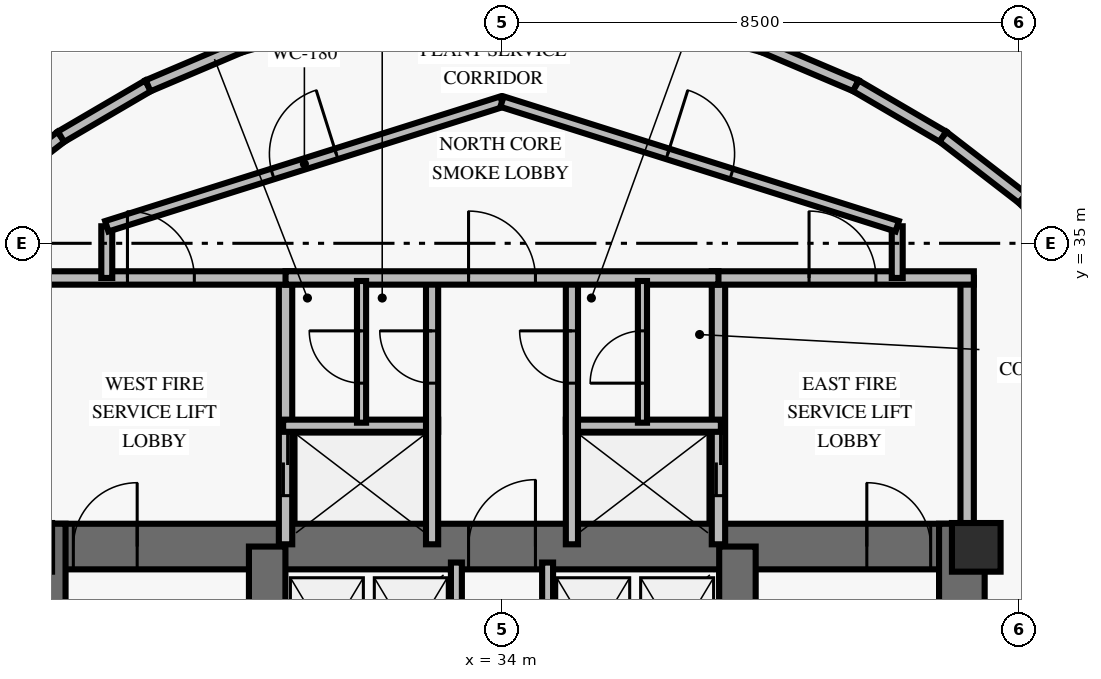
"""IFC4 building model, lengths in metres.
Left out: names, types, materials, properties, quantities, classifications, styles, units other than length and angle.
Written with IfcOpenShell. Run it as: python <this file> out.ifc"""

import sys

from ifc_helpers import new_model, si_unit, direction, frame, frame_2d, origin, origin_2d, place, context, subcontext, project, spatial, rectangle, extrude, element, fill, save


model = new_model("IFC4")
c1 = context("Model", 3, precision=1e-05, world=origin(), true_north=direction((0.0, 1.0)))
c2 = subcontext(c1, "Body", "Model", "MODEL_VIEW")
j1 = project(units=[si_unit("LENGTHUNIT", "METRE"), si_unit("PLANEANGLEUNIT", "RADIAN")], contexts=[c1])
p1 = place(None, origin())
s1 = spatial("IfcSite", under=j1, at=p1, CompositionType="ELEMENT")
p2 = place(p1, origin())
s2 = spatial("IfcBuilding", under=s1, at=p2, CompositionType="ELEMENT")
p3 = place(p2, frame((0.0, 0.0, 220.4)))
s3 = spatial("IfcBuildingStorey", under=s2, at=p3, CompositionType="ELEMENT", Elevation=220.4)
p4 = place(p3, frame((26.072, 30.013, 0.0), z_axis=(0.0, 0.0, 1.0), x_axis=(1.0, 0.0, 0.0)))
e1 = element("IfcWall", 1, at=p4, inside=s3, PredefinedType="SHEAR", context=c2, shape_type="SweptSolid", body=[
    extrude(rectangle(XDim=15.866, YDim=0.75, at=frame_2d((7.933, 0.0))), origin(), (0.0, 0.0, 1.0), 5.0),
])
p5 = place(p4, frame((0.878, 0.0, 0.0)))
e2 = element("IfcOpeningElement", 2, at=p5, cuts=e1, PredefinedType="OPENING", context=c2, shape_type="SweptSolid", body=[
    extrude(rectangle(XDim=1.05, YDim=2.15, at=frame_2d((0.525, 1.075))), frame((0.0, 0.385, 0.0), z_axis=(0.0, -1.0, 0.0), x_axis=(1.0, 0.0, 0.0)), (0.0, 0.0, 1.0), 0.77),
])
p6 = place(p4, frame((13.928, 0.0, 0.0)))
e3 = element("IfcOpeningElement", 3, at=p6, cuts=e1, PredefinedType="OPENING", context=c2, shape_type="SweptSolid", body=[
    extrude(rectangle(XDim=1.05, YDim=2.15, at=frame_2d((0.525, 1.075))), frame((0.0, 0.385, 0.0), z_axis=(0.0, -1.0, 0.0), x_axis=(1.0, 0.0, 0.0)), (0.0, 0.0, 1.0), 0.77),
])
p7 = place(p4, frame((7.378, 0.0, 0.0)))
e4 = element("IfcOpeningElement", 4, at=p7, cuts=e1, PredefinedType="OPENING", context=c2, shape_type="SweptSolid", body=[
    extrude(rectangle(XDim=1.1, YDim=2.15, at=frame_2d((0.55, 1.075))), frame((0.0, 0.385, 0.0), z_axis=(0.0, -1.0, 0.0), x_axis=(1.0, 0.0, 0.0)), (0.0, 0.0, 1.0), 0.77),
])
for number, where, z_axis, x_axis in (
    (5, (26.447, 19.812, 0.0), (0.0, 0.0, 1.0), (0.0, 1.0, 0.0)),
    (6, (41.563, 19.812, 0.0), (0.0, 0.0, 1.0), (0.0, 1.0, 0.0)),
):
    element("IfcWall", number, at=place(p3, frame(where, z_axis=z_axis, x_axis=x_axis)), inside=s3, PredefinedType="SHEAR", context=c2, shape_type="SweptSolid", body=[
        extrude(rectangle(XDim=10.576, YDim=0.75, at=frame_2d((5.288, 0.0))), origin(), (0.0, 0.0, 1.0), 5.0),
    ])
for number, where, z_axis, x_axis in (
    (7, (30.138, 20.187, 0.0), (0.0, 0.0, 1.0), (0.0, 1.0, 0.0)),
    (8, (37.872, 20.187, 0.0), (0.0, 0.0, 1.0), (0.0, 1.0, 0.0)),
):
    element("IfcWall", number, at=place(p3, frame(where, z_axis=z_axis, x_axis=x_axis)), inside=s3, PredefinedType="SHEAR", context=c2, shape_type="SweptSolid", body=[
        extrude(rectangle(XDim=9.826, YDim=0.6, at=frame_2d((4.913, 0.0))), origin(), (0.0, 0.0, 1.0), 5.0),
    ])
p8 = place(p3, frame((41.8, 30.0, 0.0), z_axis=(0.0, 0.0, 1.0), x_axis=(1.0, 0.0, 0.0)))
e9 = element("IfcColumn", 9, at=p8, inside=s3, PredefinedType="PILASTER", context=c2, shape_type="SweptSolid", body=[
    extrude(rectangle(XDim=0.8, YDim=0.8, at=origin_2d()), origin(), (0.0, 0.0, 1.0), 5.0),
])
p9 = place(p3, frame((28.995, 42.149, 0.0), z_axis=(0.0, 0.0, 1.0), x_axis=(-0.799376092576, -0.600830976747, 0.0)))
e10 = element("IfcWall", 10, at=p9, inside=s3, PredefinedType="SOLIDWALL", context=c2, shape_type="SweptSolid", body=[
    extrude(rectangle(XDim=8.129, YDim=0.3, at=frame_2d((4.064, 0.0))), origin(), (0.0, 0.0, 1.0), 3.96),
])
p10 = place(p3, frame((30.44, 30.05, 0.0), z_axis=(0.0, 0.0, 1.0), x_axis=(0.0, 1.0, 0.0)))
e11 = element("IfcWall", 11, at=p10, inside=s3, PredefinedType="SOLIDWALL", context=c2, shape_type="SweptSolid", body=[
    extrude(rectangle(XDim=4.38, YDim=0.22, at=frame_2d((2.19, 0.0))), origin(), (0.0, 0.0, 1.0), 2.8),
])
p11 = place(p10, frame((0.8, 0.0, 0.0)))
e12 = element("IfcOpeningElement", 12, at=p11, cuts=e11, PredefinedType="OPENING", context=c2, shape_type="SweptSolid", body=[
    extrude(rectangle(XDim=1.05, YDim=2.1, at=frame_2d((0.525, 1.05))), frame((0.0, 0.12, 0.0), z_axis=(0.0, -1.0, 0.0), x_axis=(1.0, 0.0, 0.0)), (0.0, 0.0, 1.0), 0.24),
])
p12 = place(p3, frame((26.24, 34.43, 0.0), z_axis=(0.0, 0.0, 1.0), x_axis=(1.0, 0.0, 0.0)))
e13 = element("IfcWall", 13, at=p12, inside=s3, PredefinedType="SOLIDWALL", context=c2, shape_type="SweptSolid", body=[
    extrude(rectangle(XDim=4.31, YDim=0.22, at=frame_2d((2.155, 0.0))), origin(), (0.0, 0.0, 1.0), 2.8),
])
p13 = place(p12, frame((1.6, 0.0, 0.0)))
e14 = element("IfcOpeningElement", 14, at=p13, cuts=e13, PredefinedType="OPENING", context=c2, shape_type="SweptSolid", body=[
    extrude(rectangle(XDim=1.1, YDim=2.15, at=frame_2d((0.55, 1.075))), frame((0.0, 0.12, 0.0), z_axis=(0.0, -1.0, 0.0), x_axis=(1.0, 0.0, 0.0)), (0.0, 0.0, 1.0), 0.24),
])
p14 = place(p3, frame((30.4, 32.0, 0.0), z_axis=(0.0, 0.0, 1.0), x_axis=(1.0, 0.0, 0.0)))
e15 = element("IfcWall", 15, at=p14, inside=s3, PredefinedType="SOLIDWALL", context=c2, shape_type="SweptSolid", body=[
    extrude(rectangle(XDim=2.55, YDim=0.2, at=frame_2d((1.275, 0.0))), origin(), (0.0, 0.0, 1.0), 2.8),
])
p15 = place(p3, frame((32.85, 30.05, 0.0), z_axis=(0.0, 0.0, 1.0), x_axis=(0.0, 1.0, 0.0)))
e16 = element("IfcWall", 16, at=p15, inside=s3, PredefinedType="SOLIDWALL", context=c2, shape_type="SweptSolid", body=[
    extrude(rectangle(XDim=4.38, YDim=0.2, at=frame_2d((2.19, 0.0))), origin(), (0.0, 0.0, 1.0), 2.8),
])
p16 = place(p15, frame((2.65, 0.0, 0.0)))
e17 = element("IfcOpeningElement", 17, at=p16, cuts=e16, PredefinedType="OPENING", context=c2, shape_type="SweptSolid", body=[
    extrude(rectangle(XDim=0.86, YDim=2.05, at=frame_2d((0.43, 1.025))), frame((0.0, 0.11, 0.0), z_axis=(0.0, -1.0, 0.0), x_axis=(1.0, 0.0, 0.0)), (0.0, 0.0, 1.0), 0.22),
])
p17 = place(p3, frame((37.56, 30.05, 0.0), z_axis=(0.0, 0.0, 1.0), x_axis=(0.0, 1.0, 0.0)))
e18 = element("IfcWall", 18, at=p17, inside=s3, PredefinedType="SOLIDWALL", context=c2, shape_type="SweptSolid", body=[
    extrude(rectangle(XDim=4.38, YDim=0.22, at=frame_2d((2.19, 0.0))), origin(), (0.0, 0.0, 1.0), 2.8),
])
p18 = place(p17, frame((0.8, 0.0, 0.0)))
e19 = element("IfcOpeningElement", 19, at=p18, cuts=e18, PredefinedType="OPENING", context=c2, shape_type="SweptSolid", body=[
    extrude(rectangle(XDim=1.05, YDim=2.1, at=frame_2d((0.525, 1.05))), frame((0.0, 0.12, 0.0), z_axis=(0.0, -1.0, 0.0), x_axis=(1.0, 0.0, 0.0)), (0.0, 0.0, 1.0), 0.24),
])
p19 = place(p3, frame((41.65, 30.05, 0.0), z_axis=(0.0, 0.0, 1.0), x_axis=(0.0, 1.0, 0.0)))
e20 = element("IfcWall", 20, at=p19, inside=s3, PredefinedType="SOLIDWALL", context=c2, shape_type="SweptSolid", body=[
    extrude(rectangle(XDim=4.38, YDim=0.22, at=frame_2d((2.19, 0.0))), origin(), (0.0, 0.0, 1.0), 2.8),
])
p20 = place(p3, frame((37.45, 34.43, 0.0), z_axis=(0.0, 0.0, 1.0), x_axis=(1.0, 0.0, 0.0)))
e21 = element("IfcWall", 21, at=p20, inside=s3, PredefinedType="SOLIDWALL", context=c2, shape_type="SweptSolid", body=[
    extrude(rectangle(XDim=4.31, YDim=0.22, at=frame_2d((2.155, 0.0))), origin(), (0.0, 0.0, 1.0), 2.8),
])
p21 = place(p20, frame((1.6, 0.0, 0.0)))
e22 = element("IfcOpeningElement", 22, at=p21, cuts=e21, PredefinedType="OPENING", context=c2, shape_type="SweptSolid", body=[
    extrude(rectangle(XDim=1.1, YDim=2.15, at=frame_2d((0.55, 1.075))), frame((0.0, 0.12, 0.0), z_axis=(0.0, -1.0, 0.0), x_axis=(1.0, 0.0, 0.0)), (0.0, 0.0, 1.0), 0.24),
])
p22 = place(p3, frame((35.05, 32.0, 0.0), z_axis=(0.0, 0.0, 1.0), x_axis=(1.0, 0.0, 0.0)))
e23 = element("IfcWall", 23, at=p22, inside=s3, PredefinedType="SOLIDWALL", context=c2, shape_type="SweptSolid", body=[
    extrude(rectangle(XDim=2.55, YDim=0.2, at=frame_2d((1.275, 0.0))), origin(), (0.0, 0.0, 1.0), 2.8),
])
p23 = place(p3, frame((35.15, 30.05, 0.0), z_axis=(0.0, 0.0, 1.0), x_axis=(0.0, 1.0, 0.0)))
e24 = element("IfcWall", 24, at=p23, inside=s3, PredefinedType="SOLIDWALL", context=c2, shape_type="SweptSolid", body=[
    extrude(rectangle(XDim=4.38, YDim=0.2, at=frame_2d((2.19, 0.0))), origin(), (0.0, 0.0, 1.0), 2.8),
])
p24 = place(p23, frame((2.65, 0.0, 0.0)))
e25 = element("IfcOpeningElement", 25, at=p24, cuts=e24, PredefinedType="OPENING", context=c2, shape_type="SweptSolid", body=[
    extrude(rectangle(XDim=0.86, YDim=2.05, at=frame_2d((0.43, 1.025))), frame((0.0, 0.11, 0.0), z_axis=(0.0, -1.0, 0.0), x_axis=(1.0, 0.0, 0.0)), (0.0, 0.0, 1.0), 0.22),
])
p25 = place(p3, frame((30.44, 34.43, 0.0), z_axis=(0.0, 0.0, 1.0), x_axis=(1.0, 0.0, 0.0)))
e26 = element("IfcWall", 26, at=p25, inside=s3, PredefinedType="SOLIDWALL", context=c2, shape_type="SweptSolid", body=[
    extrude(rectangle(XDim=7.12, YDim=0.22, at=frame_2d((3.56, 0.0))), origin(), (0.0, 0.0, 1.0), 2.8),
])
p26 = place(p25, frame((3.01, 0.0, 0.0)))
e27 = element("IfcOpeningElement", 27, at=p26, cuts=e26, PredefinedType="OPENING", context=c2, shape_type="SweptSolid", body=[
    extrude(rectangle(XDim=1.1, YDim=2.15, at=frame_2d((0.55, 1.075))), frame((0.0, 0.12, 0.0), z_axis=(0.0, -1.0, 0.0), x_axis=(1.0, 0.0, 0.0)), (0.0, 0.0, 1.0), 0.24),
])
p27 = place(p3, frame((31.69, 32.05, 0.0), z_axis=(0.0, 0.0, 1.0), x_axis=(0.0, 1.0, 0.0)))
e28 = element("IfcWall", 28, at=p27, inside=s3, PredefinedType="PARTITIONING", context=c2, shape_type="SweptSolid", body=[
    extrude(rectangle(XDim=2.33, YDim=0.15, at=frame_2d((1.165, 0.0))), origin(), (0.0, 0.0, 1.0), 2.8),
])
p28 = place(p27, frame((0.65, 0.0, 0.0)))
e29 = element("IfcOpeningElement", 29, at=p28, cuts=e28, PredefinedType="OPENING", context=c2, shape_type="SweptSolid", body=[
    extrude(rectangle(XDim=0.86, YDim=2.05, at=frame_2d((0.43, 1.025))), frame((0.0, 0.085, 0.0), z_axis=(0.0, -1.0, 0.0), x_axis=(1.0, 0.0, 0.0)), (0.0, 0.0, 1.0), 0.17),
])
p29 = place(p3, frame((36.31, 32.05, 0.0), z_axis=(0.0, 0.0, 1.0), x_axis=(0.0, 1.0, 0.0)))
e30 = element("IfcWall", 30, at=p29, inside=s3, PredefinedType="PARTITIONING", context=c2, shape_type="SweptSolid", body=[
    extrude(rectangle(XDim=2.33, YDim=0.15, at=frame_2d((1.165, 0.0))), origin(), (0.0, 0.0, 1.0), 2.8),
])
p30 = place(p29, frame((0.65, 0.0, 0.0)))
e31 = element("IfcOpeningElement", 31, at=p30, cuts=e30, PredefinedType="OPENING", context=c2, shape_type="SweptSolid", body=[
    extrude(rectangle(XDim=0.86, YDim=2.05, at=frame_2d((0.43, 1.025))), frame((0.0, 0.085, 0.0), z_axis=(0.0, -1.0, 0.0), x_axis=(1.0, 0.0, 0.0)), (0.0, 0.0, 1.0), 0.17),
])
for number, where, z_axis, x_axis in (
    (32, (33.25, 27.28, 0.0), (0.0, 0.0, 1.0), (0.0, 1.0, 0.0)),
    (33, (34.75, 27.28, 0.0), (0.0, 0.0, 1.0), (0.0, 1.0, 0.0)),
):
    element("IfcWall", number, at=place(p3, frame(where, z_axis=z_axis, x_axis=x_axis)), inside=s3, PredefinedType="SOLIDWALL", context=c2, shape_type="SweptSolid", body=[
        extrude(rectangle(XDim=2.47, YDim=0.18, at=frame_2d((1.235, 0.0))), origin(), (0.0, 0.0, 1.0), 2.8),
    ])
for number, where, z_axis, x_axis in (
    (34, (27.5, 34.43, 0.0), (0.0, 0.0, 1.0), (0.0, 1.0, 0.0)),
    (35, (40.5, 35.28, 0.0), (0.0, 0.0, 1.0), (0.0, -1.0, 0.0)),
):
    element("IfcWall", number, at=place(p3, frame(where, z_axis=z_axis, x_axis=x_axis)), inside=s3, PredefinedType="PARTITIONING", context=c2, shape_type="SweptSolid", body=[
        extrude(rectangle(XDim=0.85, YDim=0.18, at=frame_2d((0.425, 0.0))), origin(), (0.0, 0.0, 1.0), 2.8),
    ])
p31 = place(p3, frame((27.5, 35.28, 0.0), z_axis=(0.0, 0.0, 1.0), x_axis=(0.953691418528, 0.300786765376, 0.0)))
e36 = element("IfcWall", 36, at=p31, inside=s3, PredefinedType="PARTITIONING", context=c2, shape_type="SweptSolid", body=[
    extrude(rectangle(XDim=6.816, YDim=0.18, at=frame_2d((3.408, 0.0))), origin(), (0.0, 0.0, 1.0), 2.8),
])
p32 = place(p31, frame((2.858, 0.0, 0.0)))
e37 = element("IfcOpeningElement", 37, at=p32, cuts=e36, PredefinedType="OPENING", context=c2, shape_type="SweptSolid", body=[
    extrude(rectangle(XDim=1.1, YDim=2.15, at=frame_2d((0.55, 1.075))), frame((0.0, 0.1, 0.0), z_axis=(0.0, -1.0, 0.0), x_axis=(1.0, 0.0, 0.0)), (0.0, 0.0, 1.0), 0.2),
])
p33 = place(p3, frame((34.0, 37.33, 0.0), z_axis=(0.0, 0.0, 1.0), x_axis=(0.953691418528, -0.300786765376, 0.0)))
e38 = element("IfcWall", 38, at=p33, inside=s3, PredefinedType="PARTITIONING", context=c2, shape_type="SweptSolid", body=[
    extrude(rectangle(XDim=6.816, YDim=0.18, at=frame_2d((3.408, 0.0))), origin(), (0.0, 0.0, 1.0), 2.8),
])
p34 = place(p33, frame((2.858, 0.0, 0.0)))
e39 = element("IfcOpeningElement", 39, at=p34, cuts=e38, PredefinedType="OPENING", context=c2, shape_type="SweptSolid", body=[
    extrude(rectangle(XDim=1.1, YDim=2.15, at=frame_2d((0.55, 1.075))), frame((0.0, 0.1, 0.0), z_axis=(0.0, -1.0, 0.0), x_axis=(1.0, 0.0, 0.0)), (0.0, 0.0, 1.0), 0.2),
])
for number, where, z_axis, x_axis in (
    (40, (25.434, 35.739, 0.0), (0.0, 0.0, 1.0), (0.792, 0.611, 0.0)),
    (41, (26.747, 36.753, 0.0), (0.0, 0.0, 1.0), (0.863, 0.505, 0.0)),
):
    element("IfcWall", number, at=place(p3, frame(where, z_axis=z_axis, x_axis=x_axis)), inside=s3, PredefinedType="SOLIDWALL", context=c2, shape_type="SweptSolid", body=[
        extrude(rectangle(XDim=1.659, YDim=0.2, at=frame_2d((0.83, 0.0))), origin(), (0.0, 0.0, 1.0), 2.8),
    ])
p35 = place(p3, frame((28.179, 37.59, 0.0), z_axis=(0.0, 0.0, 1.0), x_axis=(0.920487144923, 0.390772844543, 0.0)))
e42 = element("IfcWall", 42, at=p35, inside=s3, PredefinedType="SOLIDWALL", context=c2, shape_type="SweptSolid", body=[
    extrude(rectangle(XDim=1.659, YDim=0.2, at=frame_2d((0.829, 0.0))), origin(), (0.0, 0.0, 1.0), 2.8),
])
for number, where, z_axis, x_axis in (
    (43, (29.706, 38.239, 0.0), (0.0, 0.0, 1.0), (0.963, 0.27, 0.0)),
    (44, (36.697, 38.687, 0.0), (0.0, 0.0, 1.0), (0.963, -0.27, 0.0)),
):
    element("IfcWall", number, at=place(p3, frame(where, z_axis=z_axis, x_axis=x_axis)), inside=s3, PredefinedType="SOLIDWALL", context=c2, shape_type="SweptSolid", body=[
        extrude(rectangle(XDim=1.659, YDim=0.2, at=frame_2d((0.83, 0.0))), origin(), (0.0, 0.0, 1.0), 2.8),
    ])
p36 = place(p3, frame((38.294, 38.239, 0.0), z_axis=(0.0, 0.0, 1.0), x_axis=(0.920487144923, -0.390772844543, 0.0)))
e45 = element("IfcWall", 45, at=p36, inside=s3, PredefinedType="SOLIDWALL", context=c2, shape_type="SweptSolid", body=[
    extrude(rectangle(XDim=1.659, YDim=0.2, at=frame_2d((0.829, 0.0))), origin(), (0.0, 0.0, 1.0), 2.8),
])
for number, where, z_axis, x_axis in (
    (46, (39.821, 37.59, 0.0), (0.0, 0.0, 1.0), (0.863, -0.505, 0.0)),
    (47, (41.253, 36.753, 0.0), (0.0, 0.0, 1.0), (0.792, -0.611, 0.0)),
):
    element("IfcWall", number, at=place(p3, frame(where, z_axis=z_axis, x_axis=x_axis)), inside=s3, PredefinedType="SOLIDWALL", context=c2, shape_type="SweptSolid", body=[
        extrude(rectangle(XDim=1.659, YDim=0.2, at=frame_2d((0.83, 0.0))), origin(), (0.0, 0.0, 1.0), 2.8),
    ])
p37 = place(p3, frame((42.566, 35.739, 0.0), z_axis=(0.0, 0.0, 1.0), x_axis=(0.707106781187, -0.707106781187, 0.0)))
e48 = element("IfcWall", 48, at=p37, inside=s3, PredefinedType="SOLIDWALL", context=c2, shape_type="SweptSolid", body=[
    extrude(rectangle(XDim=1.659, YDim=0.2, at=frame_2d((0.83, 0.0))), origin(), (0.0, 0.0, 1.0), 2.8),
])
p38 = place(p37, frame((0.304, 0.0, 0.0)))
e49 = element("IfcOpeningElement", 49, at=p38, cuts=e48, PredefinedType="OPENING", context=c2, shape_type="SweptSolid", body=[
    extrude(rectangle(XDim=1.05, YDim=2.15, at=frame_2d((0.525, 1.075))), frame((0.0, 0.11, 0.0), z_axis=(0.0, -1.0, 0.0), x_axis=(1.0, 0.0, 0.0)), (0.0, 0.0, 1.0), 0.22),
])
p39 = place(p5, origin())
e50 = element("IfcDoor", 50, at=p39, inside=s3, OperationType="SINGLE_SWING_RIGHT", PredefinedType="DOOR", context=c2, shape_type="SweptSolid", body=[
    extrude(rectangle(XDim=1.05, YDim=2.15, at=frame_2d((0.525, 1.075))), frame((0.0, 0.025, 0.0), z_axis=(0.0, -1.0, 0.0), x_axis=(1.0, 0.0, 0.0)), (0.0, 0.0, 1.0), 0.05),
])
fill(e2, e50)
p40 = place(p6, origin())
e51 = element("IfcDoor", 51, at=p40, inside=s3, OperationType="SINGLE_SWING_LEFT", PredefinedType="DOOR", context=c2, shape_type="SweptSolid", body=[
    extrude(rectangle(XDim=1.05, YDim=2.15, at=frame_2d((0.525, 1.075))), frame((0.0, 0.025, 0.0), z_axis=(0.0, -1.0, 0.0), x_axis=(1.0, 0.0, 0.0)), (0.0, 0.0, 1.0), 0.05),
])
fill(e3, e51)
p41 = place(p7, origin())
e52 = element("IfcDoor", 52, at=p41, inside=s3, OperationType="SINGLE_SWING_RIGHT", PredefinedType="DOOR", context=c2, shape_type="SweptSolid", body=[
    extrude(rectangle(XDim=1.1, YDim=2.15, at=frame_2d((0.55, 1.075))), frame((0.0, 0.025, 0.0), z_axis=(0.0, -1.0, 0.0), x_axis=(1.0, 0.0, 0.0)), (0.0, 0.0, 1.0), 0.05),
])
fill(e4, e52)
p42 = place(p13, origin())
e53 = element("IfcDoor", 53, at=p42, inside=s3, OperationType="SINGLE_SWING_LEFT", PredefinedType="DOOR", context=c2, shape_type="SweptSolid", body=[
    extrude(rectangle(XDim=1.1, YDim=2.15, at=frame_2d((0.55, 1.075))), frame((0.0, 0.025, 0.0), z_axis=(0.0, -1.0, 0.0), x_axis=(1.0, 0.0, 0.0)), (0.0, 0.0, 1.0), 0.05),
])
fill(e14, e53)
p43 = place(p11, origin())
e54 = element("IfcDoor", 54, at=p43, inside=s3, OperationType="DOUBLE_DOOR_SLIDING", PredefinedType="USERDEFINED", context=c2, shape_type="SweptSolid", body=[
    extrude(rectangle(XDim=1.05, YDim=2.1, at=frame_2d((0.525, 1.05))), frame((0.0, 0.025, 0.0), z_axis=(0.0, -1.0, 0.0), x_axis=(1.0, 0.0, 0.0)), (0.0, 0.0, 1.0), 0.05),
])
fill(e12, e54)
p44 = place(p16, origin())
e55 = element("IfcDoor", 55, at=p44, inside=s3, OperationType="SINGLE_SWING_RIGHT", PredefinedType="TRAPDOOR", context=c2, shape_type="SweptSolid", body=[
    extrude(rectangle(XDim=0.86, YDim=2.05, at=frame_2d((0.43, 1.025))), frame((0.0, 0.025, 0.0), z_axis=(0.0, -1.0, 0.0), x_axis=(1.0, 0.0, 0.0)), (0.0, 0.0, 1.0), 0.05),
])
fill(e17, e55)
p45 = place(p21, origin())
e56 = element("IfcDoor", 56, at=p45, inside=s3, OperationType="SINGLE_SWING_LEFT", PredefinedType="DOOR", context=c2, shape_type="SweptSolid", body=[
    extrude(rectangle(XDim=1.1, YDim=2.15, at=frame_2d((0.55, 1.075))), frame((0.0, 0.025, 0.0), z_axis=(0.0, -1.0, 0.0), x_axis=(1.0, 0.0, 0.0)), (0.0, 0.0, 1.0), 0.05),
])
fill(e22, e56)
p46 = place(p18, origin())
e57 = element("IfcDoor", 57, at=p46, inside=s3, OperationType="DOUBLE_DOOR_SLIDING", PredefinedType="USERDEFINED", context=c2, shape_type="SweptSolid", body=[
    extrude(rectangle(XDim=1.05, YDim=2.1, at=frame_2d((0.525, 1.05))), frame((0.0, 0.025, 0.0), z_axis=(0.0, -1.0, 0.0), x_axis=(1.0, 0.0, 0.0)), (0.0, 0.0, 1.0), 0.05),
])
fill(e19, e57)
p47 = place(p24, origin())
e58 = element("IfcDoor", 58, at=p47, inside=s3, OperationType="SINGLE_SWING_RIGHT", PredefinedType="TRAPDOOR", context=c2, shape_type="SweptSolid", body=[
    extrude(rectangle(XDim=0.86, YDim=2.05, at=frame_2d((0.43, 1.025))), frame((0.0, 0.025, 0.0), z_axis=(0.0, -1.0, 0.0), x_axis=(1.0, 0.0, 0.0)), (0.0, 0.0, 1.0), 0.05),
])
fill(e25, e58)
p48 = place(p26, origin())
e59 = element("IfcDoor", 59, at=p48, inside=s3, OperationType="SINGLE_SWING_LEFT", PredefinedType="DOOR", context=c2, shape_type="SweptSolid", body=[
    extrude(rectangle(XDim=1.1, YDim=2.15, at=frame_2d((0.55, 1.075))), frame((0.0, 0.025, 0.0), z_axis=(0.0, -1.0, 0.0), x_axis=(1.0, 0.0, 0.0)), (0.0, 0.0, 1.0), 0.05),
])
fill(e27, e59)
p49 = place(p28, origin())
e60 = element("IfcDoor", 60, at=p49, inside=s3, OperationType="SINGLE_SWING_RIGHT", PredefinedType="TRAPDOOR", context=c2, shape_type="SweptSolid", body=[
    extrude(rectangle(XDim=0.86, YDim=2.05, at=frame_2d((0.43, 1.025))), frame((0.0, 0.025, 0.0), z_axis=(0.0, -1.0, 0.0), x_axis=(1.0, 0.0, 0.0)), (0.0, 0.0, 1.0), 0.05),
])
fill(e29, e60)
p50 = place(p30, origin())
e61 = element("IfcDoor", 61, at=p50, inside=s3, OperationType="SINGLE_SWING_LEFT", PredefinedType="TRAPDOOR", context=c2, shape_type="SweptSolid", body=[
    extrude(rectangle(XDim=0.86, YDim=2.05, at=frame_2d((0.43, 1.025))), frame((0.0, 0.025, 0.0), z_axis=(0.0, -1.0, 0.0), x_axis=(1.0, 0.0, 0.0)), (0.0, 0.0, 1.0), 0.05),
])
fill(e31, e61)
p51 = place(p32, origin())
e62 = element("IfcDoor", 62, at=p51, inside=s3, OperationType="SINGLE_SWING_RIGHT", PredefinedType="DOOR", context=c2, shape_type="SweptSolid", body=[
    extrude(rectangle(XDim=1.1, YDim=2.15, at=frame_2d((0.55, 1.075))), frame((0.0, 0.025, 0.0), z_axis=(0.0, -1.0, 0.0), x_axis=(1.0, 0.0, 0.0)), (0.0, 0.0, 1.0), 0.05),
])
fill(e37, e62)
p52 = place(p34, origin())
e63 = element("IfcDoor", 63, at=p52, inside=s3, OperationType="SINGLE_SWING_LEFT", PredefinedType="DOOR", context=c2, shape_type="SweptSolid", body=[
    extrude(rectangle(XDim=1.1, YDim=2.15, at=frame_2d((0.55, 1.075))), frame((0.0, 0.025, 0.0), z_axis=(0.0, -1.0, 0.0), x_axis=(1.0, 0.0, 0.0)), (0.0, 0.0, 1.0), 0.05),
])
fill(e39, e63)
save(model, sys.argv[1])
